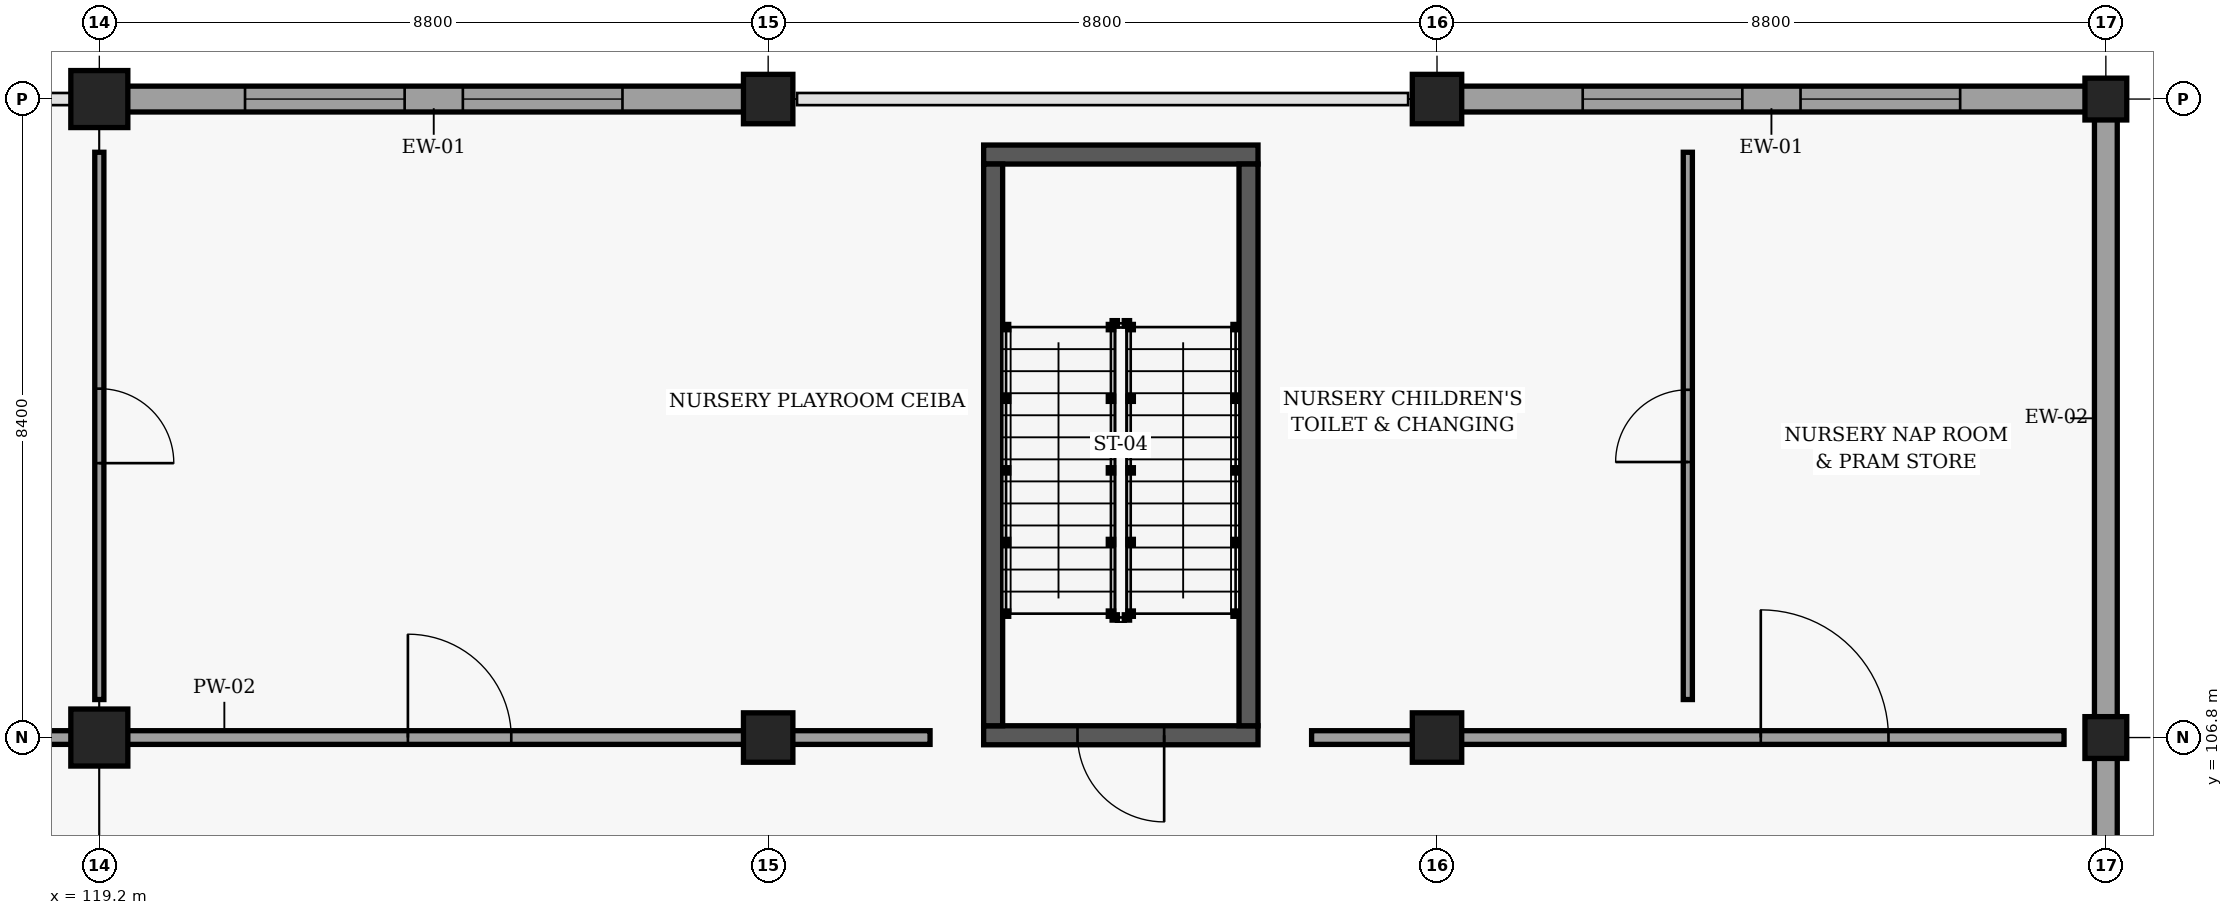
"""IFC4 building model, lengths in metres.
Left out: names, types, materials, properties, quantities, classifications, styles, units other than length and angle.
Written with IfcOpenShell. Run it as: python <this file> out.ifc"""

import sys

from ifc_helpers import new_model, si_unit, direction, frame, frame_2d, origin, origin_2d, place, context, subcontext, project, spatial, rectangle, circle, extrude, element, fill, save


model = new_model("IFC4")
c1 = context("Model", 3, precision=1e-05, world=origin(), true_north=direction((0.0, 1.0)))
c2 = subcontext(c1, "Body", "Model", "MODEL_VIEW")
j1 = project(units=[si_unit("LENGTHUNIT", "METRE"), si_unit("PLANEANGLEUNIT", "RADIAN")], contexts=[c1])
p1 = place(None, origin())
s1 = spatial("IfcSite", under=j1, at=p1, CompositionType="ELEMENT")
p2 = place(p1, origin())
s2 = spatial("IfcBuilding", under=s1, at=p2, CompositionType="ELEMENT")
p3 = place(p2, origin())
s3 = spatial("IfcBuildingStorey", under=s2, at=p3, CompositionType="ELEMENT", Elevation=0.0)
for number, where, z_axis, x_axis in (
    (1, (119.2, 106.8, 0.0), (0.0, 0.0, 1.0), (1.0, 0.0, 0.0)),
    (2, (119.2, 115.2, 0.0), (0.0, 0.0, 1.0), (1.0, 0.0, 0.0)),
):
    element("IfcColumn", number, at=place(p3, frame(where, z_axis=z_axis, x_axis=x_axis)), inside=s3, PredefinedType="COLUMN", context=c2, shape_type="SweptSolid", body=[
        extrude(rectangle(XDim=0.75, YDim=0.75, at=origin_2d()), origin(), (0.0, 0.0, 1.0), 4.8),
    ])
for number, where, z_axis, x_axis in (
    (3, (128.0, 106.8, 0.0), (0.0, 0.0, 1.0), (1.0, 0.0, 0.0)),
    (4, (128.0, 115.2, 0.0), (0.0, 0.0, 1.0), (1.0, 0.0, 0.0)),
    (5, (136.8, 106.8, 0.0), (0.0, 0.0, 1.0), (1.0, 0.0, 0.0)),
    (6, (136.8, 115.2, 0.0), (0.0, 0.0, 1.0), (1.0, 0.0, 0.0)),
):
    element("IfcColumn", number, at=place(p3, frame(where, z_axis=z_axis, x_axis=x_axis)), inside=s3, PredefinedType="COLUMN", context=c2, shape_type="SweptSolid", body=[
        extrude(rectangle(XDim=0.65, YDim=0.65, at=origin_2d()), origin(), (0.0, 0.0, 1.0), 4.8),
    ])
for number, where, z_axis, x_axis in (
    (7, (145.6, 106.8, 0.0), (0.0, 0.0, 1.0), (1.0, 0.0, 0.0)),
    (8, (145.6, 115.2, 0.0), (0.0, 0.0, 1.0), (1.0, 0.0, 0.0)),
):
    element("IfcColumn", number, at=place(p3, frame(where, z_axis=z_axis, x_axis=x_axis)), inside=s3, PredefinedType="PILASTER", context=c2, shape_type="SweptSolid", body=[
        extrude(circle(Radius=0.275, at=origin_2d()), origin(), (0.0, 0.0, 1.0), 4.8),
    ])
p4 = place(p3, frame((119.3, 115.2, 0.0), z_axis=(0.0, 0.0, 1.0), x_axis=(1.0, 0.0, 0.0)))
e9 = element("IfcWall", 9, at=p4, inside=s3, PredefinedType="SOLIDWALL", context=c2, shape_type="SweptSolid", body=[
    extrude(rectangle(XDim=8.6, YDim=0.34, at=frame_2d((4.3, 0.0))), origin(), (0.0, 0.0, 1.0), 3.675),
])
p5 = place(p4, frame((1.817, 0.0, 0.95)))
e10 = element("IfcOpeningElement", 10, at=p5, cuts=e9, PredefinedType="OPENING", context=c2, shape_type="SweptSolid", body=[
    extrude(rectangle(XDim=2.1, YDim=1.8, at=frame_2d((1.05, 0.9))), frame((0.0, 0.18, 0.0), z_axis=(0.0, -1.0, 0.0), x_axis=(1.0, 0.0, 0.0)), (0.0, 0.0, 1.0), 0.36),
])
p6 = place(p4, frame((4.683, 0.0, 0.95)))
e11 = element("IfcOpeningElement", 11, at=p6, cuts=e9, PredefinedType="OPENING", context=c2, shape_type="SweptSolid", body=[
    extrude(rectangle(XDim=2.1, YDim=1.8, at=frame_2d((1.05, 0.9))), frame((0.0, 0.18, 0.0), z_axis=(0.0, -1.0, 0.0), x_axis=(1.0, 0.0, 0.0)), (0.0, 0.0, 1.0), 0.36),
])
p7 = place(p3, frame((136.9, 115.2, 0.0), z_axis=(0.0, 0.0, 1.0), x_axis=(1.0, 0.0, 0.0)))
e12 = element("IfcWall", 12, at=p7, inside=s3, PredefinedType="SOLIDWALL", context=c2, shape_type="SweptSolid", body=[
    extrude(rectangle(XDim=8.6, YDim=0.34, at=frame_2d((4.3, 0.0))), origin(), (0.0, 0.0, 1.0), 3.675),
])
p8 = place(p7, frame((1.817, 0.0, 0.95)))
e13 = element("IfcOpeningElement", 13, at=p8, cuts=e12, PredefinedType="OPENING", context=c2, shape_type="SweptSolid", body=[
    extrude(rectangle(XDim=2.1, YDim=1.8, at=frame_2d((1.05, 0.9))), frame((0.0, 0.18, 0.0), z_axis=(0.0, -1.0, 0.0), x_axis=(1.0, 0.0, 0.0)), (0.0, 0.0, 1.0), 0.36),
])
p9 = place(p7, frame((4.683, 0.0, 0.95)))
e14 = element("IfcOpeningElement", 14, at=p9, cuts=e12, PredefinedType="OPENING", context=c2, shape_type="SweptSolid", body=[
    extrude(rectangle(XDim=2.1, YDim=1.8, at=frame_2d((1.05, 0.9))), frame((0.0, 0.18, 0.0), z_axis=(0.0, -1.0, 0.0), x_axis=(1.0, 0.0, 0.0)), (0.0, 0.0, 1.0), 0.36),
])
p10 = place(p3, frame((145.6, 98.5, 0.0), z_axis=(0.0, 0.0, 1.0), x_axis=(0.0, 1.0, 0.0)))
e15 = element("IfcWall", 15, at=p10, inside=s3, PredefinedType="SOLIDWALL", context=c2, shape_type="SweptSolid", body=[
    extrude(rectangle(XDim=8.2, YDim=0.3, at=frame_2d((4.1, 0.0))), origin(), (0.0, 0.0, 1.0), 4.075),
])
p11 = place(p10, frame((2.3, 0.0, 0.0)))
e16 = element("IfcOpeningElement", 16, at=p11, cuts=e15, PredefinedType="OPENING", context=c2, shape_type="SweptSolid", body=[
    extrude(rectangle(XDim=1.8, YDim=2.25, at=frame_2d((0.9, 1.125))), frame((0.0, 0.16, 0.0), z_axis=(0.0, -1.0, 0.0), x_axis=(1.0, 0.0, 0.0)), (0.0, 0.0, 1.0), 0.32),
])
p12 = place(p3, frame((145.6, 106.9, 0.0), z_axis=(0.0, 0.0, 1.0), x_axis=(0.0, 1.0, 0.0)))
e17 = element("IfcWall", 17, at=p12, inside=s3, PredefinedType="SOLIDWALL", context=c2, shape_type="SweptSolid", body=[
    extrude(rectangle(XDim=8.2, YDim=0.3, at=frame_2d((4.1, 0.0))), origin(), (0.0, 0.0, 1.0), 4.075),
])
p13 = place(p3, frame((134.445, 106.83, 0.0), z_axis=(0.0, 0.0, 1.0), x_axis=(-1.0, 0.0, 0.0)))
e18 = element("IfcWall", 18, at=p13, inside=s3, PredefinedType="SHEAR", context=c2, shape_type="SweptSolid", body=[
    extrude(rectangle(XDim=3.61, YDim=0.25, at=frame_2d((1.805, 0.0))), origin(), (0.0, 0.0, 1.0), 4.56),
])
p14 = place(p13, frame((1.235, 0.0, 0.0)))
e19 = element("IfcOpeningElement", 19, at=p14, cuts=e18, PredefinedType="OPENING", context=c2, shape_type="SweptSolid", body=[
    extrude(rectangle(XDim=1.14, YDim=2.15, at=frame_2d((0.57, 1.075))), frame((0.0, 0.135, 0.0), z_axis=(0.0, -1.0, 0.0), x_axis=(1.0, 0.0, 0.0)), (0.0, 0.0, 1.0), 0.27),
])
p15 = place(p3, frame((130.835, 114.47, 0.0), z_axis=(0.0, 0.0, 1.0), x_axis=(1.0, 0.0, 0.0)))
e20 = element("IfcWall", 20, at=p15, inside=s3, PredefinedType="SHEAR", context=c2, shape_type="SweptSolid", body=[
    extrude(rectangle(XDim=3.61, YDim=0.25, at=frame_2d((1.805, 0.0))), origin(), (0.0, 0.0, 1.0), 4.56),
])
for number, where, z_axis, x_axis in (
    (21, (130.96, 106.955, 0.0), (0.0, 0.0, 1.0), (0.0, 1.0, 0.0)),
    (22, (134.32, 114.345, 0.0), (0.0, 0.0, 1.0), (0.0, -1.0, 0.0)),
):
    element("IfcWall", number, at=place(p3, frame(where, z_axis=z_axis, x_axis=x_axis)), inside=s3, PredefinedType="SHEAR", context=c2, shape_type="SweptSolid", body=[
        extrude(rectangle(XDim=7.39, YDim=0.25, at=frame_2d((3.695, 0.0))), origin(), (0.0, 0.0, 1.0), 4.56),
    ])
p16 = place(p3, frame((117.75, 106.8, 0.0), z_axis=(0.0, 0.0, 1.0), x_axis=(1.0, 0.0, 0.0)))
e23 = element("IfcWall", 23, at=p16, inside=s3, PredefinedType="PARTITIONING", context=c2, shape_type="SweptSolid", body=[
    extrude(rectangle(XDim=12.38, YDim=0.18, at=frame_2d((6.19, 0.0))), origin(), (0.0, 0.0, 1.0), 3.675),
])
p17 = place(p16, frame((5.51, 0.0, 0.0)))
e24 = element("IfcOpeningElement", 24, at=p17, cuts=e23, PredefinedType="OPENING", context=c2, shape_type="SweptSolid", body=[
    extrude(rectangle(XDim=1.36, YDim=2.22, at=frame_2d((0.68, 1.11))), frame((0.0, 0.1, 0.0), z_axis=(0.0, -1.0, 0.0), x_axis=(1.0, 0.0, 0.0)), (0.0, 0.0, 1.0), 0.2),
])
p18 = place(p3, frame((135.15, 106.8, 0.0), z_axis=(0.0, 0.0, 1.0), x_axis=(1.0, 0.0, 0.0)))
e25 = element("IfcWall", 25, at=p18, inside=s3, PredefinedType="PARTITIONING", context=c2, shape_type="SweptSolid", body=[
    extrude(rectangle(XDim=9.9, YDim=0.18, at=frame_2d((4.95, 0.0))), origin(), (0.0, 0.0, 1.0), 3.675),
])
p19 = place(p18, frame((5.91, 0.0, 0.0)))
e26 = element("IfcOpeningElement", 26, at=p19, cuts=e25, PredefinedType="OPENING", context=c2, shape_type="SweptSolid", body=[
    extrude(rectangle(XDim=1.68, YDim=2.26, at=frame_2d((0.84, 1.13))), frame((0.0, 0.1, 0.0), z_axis=(0.0, -1.0, 0.0), x_axis=(1.0, 0.0, 0.0)), (0.0, 0.0, 1.0), 0.2),
])
p20 = place(p3, frame((119.2, 107.3, 0.0), z_axis=(0.0, 0.0, 1.0), x_axis=(0.0, 1.0, 0.0)))
e27 = element("IfcWall", 27, at=p20, inside=s3, PredefinedType="PARTITIONING", context=c2, shape_type="SweptSolid", body=[
    extrude(rectangle(XDim=7.2, YDim=0.12, at=frame_2d((3.6, 0.0))), origin(), (0.0, 0.0, 1.0), 3.775),
])
p21 = place(p20, frame((3.11, 0.0, 0.0)))
e28 = element("IfcOpeningElement", 28, at=p21, cuts=e27, PredefinedType="OPENING", context=c2, shape_type="SweptSolid", body=[
    extrude(rectangle(XDim=0.98, YDim=2.12, at=frame_2d((0.49, 1.06))), frame((0.0, 0.07, 0.0), z_axis=(0.0, -1.0, 0.0), x_axis=(1.0, 0.0, 0.0)), (0.0, 0.0, 1.0), 0.14),
])
p22 = place(p3, frame((140.1, 107.3, 0.0), z_axis=(0.0, 0.0, 1.0), x_axis=(0.0, 1.0, 0.0)))
e29 = element("IfcWall", 29, at=p22, inside=s3, PredefinedType="PARTITIONING", context=c2, shape_type="SweptSolid", body=[
    extrude(rectangle(XDim=7.2, YDim=0.12, at=frame_2d((3.6, 0.0))), origin(), (0.0, 0.0, 1.0), 4.545),
])
p23 = place(p22, frame((3.125, 0.0, 0.0)))
e30 = element("IfcOpeningElement", 30, at=p23, cuts=e29, PredefinedType="OPENING", context=c2, shape_type="SweptSolid", body=[
    extrude(rectangle(XDim=0.95, YDim=2.12, at=frame_2d((0.475, 1.06))), frame((0.0, 0.07, 0.0), z_axis=(0.0, -1.0, 0.0), x_axis=(1.0, 0.0, 0.0)), (0.0, 0.0, 1.0), 0.14),
])
p24 = place(p5, origin())
e31 = element("IfcWindow", 31, at=p24, inside=s3, PartitioningType="SINGLE_PANEL", PredefinedType="WINDOW", context=c2, shape_type="SweptSolid", body=[
    extrude(rectangle(XDim=2.1, YDim=1.8, at=frame_2d((1.05, 0.9))), frame((0.0, 0.03, 0.0), z_axis=(0.0, -1.0, 0.0), x_axis=(1.0, 0.0, 0.0)), (0.0, 0.0, 1.0), 0.06),
])
fill(e10, e31)
p25 = place(p6, origin())
e32 = element("IfcWindow", 32, at=p25, inside=s3, PartitioningType="SINGLE_PANEL", PredefinedType="WINDOW", context=c2, shape_type="SweptSolid", body=[
    extrude(rectangle(XDim=2.1, YDim=1.8, at=frame_2d((1.05, 0.9))), frame((0.0, 0.03, 0.0), z_axis=(0.0, -1.0, 0.0), x_axis=(1.0, 0.0, 0.0)), (0.0, 0.0, 1.0), 0.06),
])
fill(e11, e32)
p26 = place(p8, origin())
e33 = element("IfcWindow", 33, at=p26, inside=s3, PartitioningType="SINGLE_PANEL", PredefinedType="WINDOW", context=c2, shape_type="SweptSolid", body=[
    extrude(rectangle(XDim=2.1, YDim=1.8, at=frame_2d((1.05, 0.9))), frame((0.0, 0.03, 0.0), z_axis=(0.0, -1.0, 0.0), x_axis=(1.0, 0.0, 0.0)), (0.0, 0.0, 1.0), 0.06),
])
fill(e13, e33)
p27 = place(p9, origin())
e34 = element("IfcWindow", 34, at=p27, inside=s3, PartitioningType="SINGLE_PANEL", PredefinedType="WINDOW", context=c2, shape_type="SweptSolid", body=[
    extrude(rectangle(XDim=2.1, YDim=1.8, at=frame_2d((1.05, 0.9))), frame((0.0, 0.03, 0.0), z_axis=(0.0, -1.0, 0.0), x_axis=(1.0, 0.0, 0.0)), (0.0, 0.0, 1.0), 0.06),
])
fill(e14, e34)
p28 = place(p14, origin())
e35 = element("IfcDoor", 35, at=p28, inside=s3, OperationType="SINGLE_SWING_LEFT", PredefinedType="DOOR", context=c2, shape_type="SweptSolid", body=[
    extrude(rectangle(XDim=1.14, YDim=2.15, at=frame_2d((0.57, 1.075))), frame((0.0, 0.025, 0.0), z_axis=(0.0, -1.0, 0.0), x_axis=(1.0, 0.0, 0.0)), (0.0, 0.0, 1.0), 0.05),
])
fill(e19, e35)
p29 = place(p17, origin())
e36 = element("IfcDoor", 36, at=p29, inside=s3, OperationType="DOUBLE_DOOR_SINGLE_SWING", PredefinedType="DOOR", context=c2, shape_type="SweptSolid", body=[
    extrude(rectangle(XDim=1.36, YDim=2.22, at=frame_2d((0.68, 1.11))), frame((0.0, 0.025, 0.0), z_axis=(0.0, -1.0, 0.0), x_axis=(1.0, 0.0, 0.0)), (0.0, 0.0, 1.0), 0.05),
])
fill(e24, e36)
p30 = place(p19, origin())
e37 = element("IfcDoor", 37, at=p30, inside=s3, OperationType="DOUBLE_DOOR_SINGLE_SWING", PredefinedType="DOOR", context=c2, shape_type="SweptSolid", body=[
    extrude(rectangle(XDim=1.68, YDim=2.26, at=frame_2d((0.84, 1.13))), frame((0.0, 0.025, 0.0), z_axis=(0.0, -1.0, 0.0), x_axis=(1.0, 0.0, 0.0)), (0.0, 0.0, 1.0), 0.05),
])
fill(e26, e37)
p31 = place(p21, origin())
e38 = element("IfcDoor", 38, at=p31, inside=s3, OperationType="SINGLE_SWING_RIGHT", PredefinedType="DOOR", context=c2, shape_type="SweptSolid", body=[
    extrude(rectangle(XDim=0.98, YDim=2.12, at=frame_2d((0.49, 1.06))), frame((0.0, 0.025, 0.0), z_axis=(0.0, -1.0, 0.0), x_axis=(1.0, 0.0, 0.0)), (0.0, 0.0, 1.0), 0.05),
])
fill(e28, e38)
p32 = place(p23, origin())
e39 = element("IfcDoor", 39, at=p32, inside=s3, OperationType="SINGLE_SWING_LEFT", PredefinedType="DOOR", context=c2, shape_type="SweptSolid", body=[
    extrude(rectangle(XDim=0.95, YDim=2.12, at=frame_2d((0.475, 1.06))), frame((0.0, 0.025, 0.0), z_axis=(0.0, -1.0, 0.0), x_axis=(1.0, 0.0, 0.0)), (0.0, 0.0, 1.0), 0.05),
])
fill(e30, e39)
save(model, sys.argv[1])
